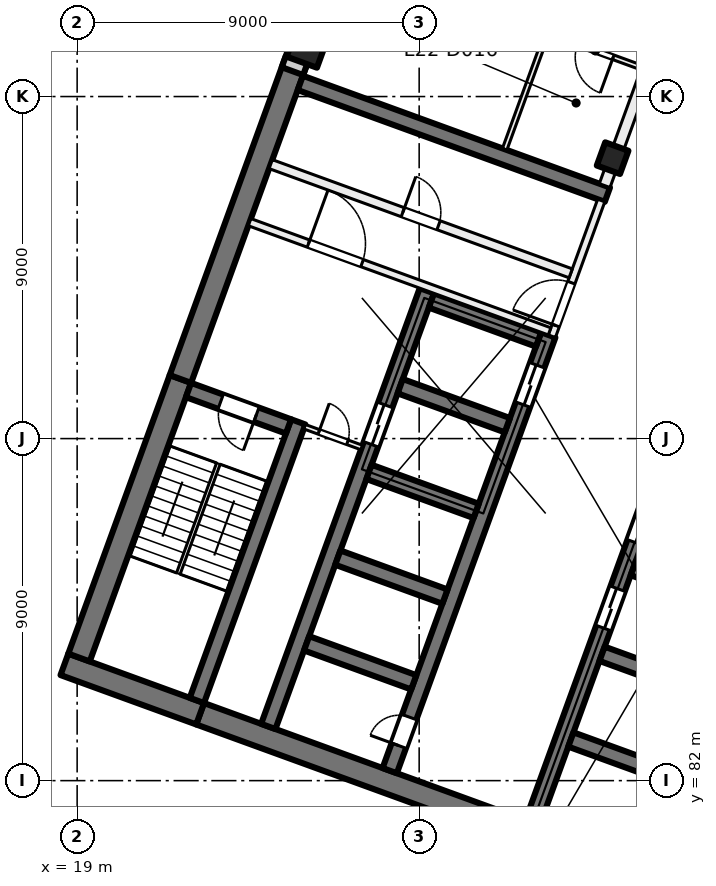
"""IFC4 building model, lengths in metres.
Left out: names, types, materials, properties, quantities, classifications, styles, units other than length and angle.
Written with IfcOpenShell. Run it as: python <this file> out.ifc"""

import sys

from ifc_helpers import new_model, si_unit, direction, frame, frame_2d, origin, origin_2d, place, context, subcontext, project, spatial, rectangle, extrude, element, fill, save


model = new_model("IFC4")
c1 = context("Model", 3, precision=1e-05, world=origin(), true_north=direction((0.0, 1.0)))
c2 = subcontext(c1, "Body", "Model", "MODEL_VIEW")
j1 = project(units=[si_unit("LENGTHUNIT", "METRE"), si_unit("PLANEANGLEUNIT", "RADIAN")], contexts=[c1])
p1 = place(None, origin())
s1 = spatial("IfcSite", under=j1, at=p1, CompositionType="ELEMENT")
p2 = place(p1, origin())
s2 = spatial("IfcBuilding", under=s1, at=p2, CompositionType="ELEMENT")
p3 = place(p2, frame((0.0, 0.0, 97.0)))
s3 = spatial("IfcBuildingStorey", under=s2, at=p3, CompositionType="ELEMENT", Elevation=97.0)
p4 = place(p3, frame((33.091, 98.379, 0.0), z_axis=(0.0, 0.0, 1.0), x_axis=(-0.342020143326, -0.939692620786, 0.0)))
e1 = element("IfcColumn", 1, at=p4, inside=s3, PredefinedType="COLUMN", context=c2, shape_type="SweptSolid", body=[
    extrude(rectangle(XDim=0.65, YDim=0.65, at=origin_2d()), origin(), (0.0, 0.0, 1.0), 4.0),
])
p5 = place(p3, frame((25.056, 101.303, 0.0), z_axis=(0.0, 0.0, 1.0), x_axis=(-0.342020143326, -0.939692620786, 0.0)))
e2 = element("IfcColumn", 2, at=p5, inside=s3, PredefinedType="COLUMN", context=c2, shape_type="SweptSolid", body=[
    extrude(rectangle(XDim=0.85, YDim=0.85, at=origin_2d()), origin(), (0.0, 0.0, 1.0), 4.0),
])
p6 = place(p3, frame((35.767, 78.835, 0.0), z_axis=(0.0, 0.0, 1.0), x_axis=(-0.939692894512, 0.342019391267, 0.0)))
e3 = element("IfcWall", 3, at=p6, inside=s3, PredefinedType="SHEAR", context=c2, shape_type="SweptSolid", body=[
    extrude(rectangle(XDim=14.4, YDim=0.6, at=frame_2d((7.2, 0.0))), origin(), (0.0, 0.0, 1.0), 4.0),
])
p7 = place(p3, frame((22.236, 83.76, 0.0), z_axis=(0.0, 0.0, 1.0), x_axis=(-0.939680822529, 0.342052557032, 0.0)))
e4 = element("IfcWall", 4, at=p7, inside=s3, PredefinedType="SHEAR", context=c2, shape_type="SweptSolid", body=[
    extrude(rectangle(XDim=3.8, YDim=0.6, at=frame_2d((1.9, 0.0))), origin(), (0.0, 0.0, 1.0), 4.0),
])
p8 = place(p3, frame((19.05, 85.239, 0.0), z_axis=(0.0, 0.0, 1.0), x_axis=(0.342016982193, 0.939693771338, 0.0)))
e5 = element("IfcWall", 5, at=p8, inside=s3, PredefinedType="SHEAR", context=c2, shape_type="SweptSolid", body=[
    extrude(rectangle(XDim=7.8, YDim=0.6, at=frame_2d((3.9, 0.0))), origin(), (0.0, 0.0, 1.0), 4.0),
])
p9 = place(p3, frame((21.717, 92.568, 0.0), z_axis=(0.0, 0.0, 1.0), x_axis=(0.342017595281, 0.939693548195, 0.0)))
e6 = element("IfcWall", 6, at=p9, inside=s3, PredefinedType="SHEAR", context=c2, shape_type="SweptSolid", body=[
    extrude(rectangle(XDim=8.925, YDim=0.6, at=frame_2d((4.462, 0.0))), origin(), (0.0, 0.0, 1.0), 4.0),
])
p10 = place(p3, frame((22.15, 84.11, 0.0), z_axis=(0.0, 0.0, 1.0), x_axis=(0.342016982193, 0.939693771338, 0.0)))
e7 = element("IfcWall", 7, at=p10, inside=s3, PredefinedType="SHEAR", context=c2, shape_type="SweptSolid", body=[
    extrude(rectangle(XDim=7.8, YDim=0.4, at=frame_2d((3.9, 0.0))), origin(), (0.0, 0.0, 1.0), 4.0),
])
p11 = place(p3, frame((24.562, 91.32, 0.0), z_axis=(0.0, 0.0, 1.0), x_axis=(-0.939717030584, 0.341953070509, 0.0)))
e8 = element("IfcWall", 8, at=p11, inside=s3, PredefinedType="SHEAR", context=c2, shape_type="SweptSolid", body=[
    extrude(rectangle(XDim=2.8, YDim=0.4, at=frame_2d((1.4, 0.0))), origin(), (0.0, 0.0, 1.0), 4.0),
])
p12 = place(p11, frame((0.9, 0.0, 0.0)))
e9 = element("IfcOpeningElement", 9, at=p12, cuts=e8, PredefinedType="OPENING", context=c2, shape_type="SweptSolid", body=[
    extrude(rectangle(XDim=1.0, YDim=2.1, at=frame_2d((0.5, 1.05))), frame((0.0, 0.21, 0.0), z_axis=(0.0, -1.0, 0.0), x_axis=(1.0, 0.0, 0.0)), (0.0, 0.0, 1.0), 0.42),
])
p13 = place(p3, frame((30.984, 80.895, 0.0), z_axis=(0.0, 0.0, 1.0), x_axis=(0.342021021735, 0.939692301071, 0.0)))
e10 = element("IfcWall", 10, at=p13, inside=s3, PredefinedType="SHEAR", context=c2, shape_type="SweptSolid", body=[
    extrude(rectangle(XDim=12.2, YDim=0.4, at=frame_2d((6.1, 0.0))), origin(), (0.0, 0.0, 1.0), 4.0),
])
p14 = place(p13, frame((5.45, 0.0, 0.0)))
e11 = element("IfcOpeningElement", 11, at=p14, cuts=e10, PredefinedType="OPENING", context=c2, shape_type="SweptSolid", body=[
    extrude(rectangle(XDim=1.1, YDim=2.1, at=frame_2d((0.55, 1.05))), frame((0.0, 0.21, 0.0), z_axis=(0.0, -1.0, 0.0), x_axis=(1.0, 0.0, 0.0)), (0.0, 0.0, 1.0), 0.42),
])
p15 = place(p13, frame((7.85, 0.0, 0.0)))
e12 = element("IfcOpeningElement", 12, at=p15, cuts=e10, PredefinedType="OPENING", context=c2, shape_type="SweptSolid", body=[
    extrude(rectangle(XDim=1.1, YDim=2.1, at=frame_2d((0.55, 1.05))), frame((0.0, 0.21, 0.0), z_axis=(0.0, -1.0, 0.0), x_axis=(1.0, 0.0, 0.0)), (0.0, 0.0, 1.0), 0.42),
])
p16 = place(p13, frame((10.25, 0.0, 0.0)))
e13 = element("IfcOpeningElement", 13, at=p16, cuts=e10, PredefinedType="OPENING", context=c2, shape_type="SweptSolid", body=[
    extrude(rectangle(XDim=1.1, YDim=2.1, at=frame_2d((0.55, 1.05))), frame((0.0, 0.21, 0.0), z_axis=(0.0, -1.0, 0.0), x_axis=(1.0, 0.0, 0.0)), (0.0, 0.0, 1.0), 0.42),
])
for number, where, z_axis, x_axis in (
    (14, (34.812, 82.056, 0.0), (0.0, 0.0, 1.0), (-0.94, 0.342, 0.0)),
    (15, (35.632, 84.311, 0.0), (0.0, 0.0, 1.0), (-0.94, 0.342, 0.0)),
    (16, (36.453, 86.566, 0.0), (0.0, 0.0, 1.0), (-0.94, 0.342, 0.0)),
):
    element("IfcWall", number, at=place(p3, frame(where, z_axis=z_axis, x_axis=x_axis)), inside=s3, PredefinedType="SHEAR", context=c2, shape_type="SweptSolid", body=[
        extrude(rectangle(XDim=3.0, YDim=0.4, at=frame_2d((1.5, 0.0))), origin(), (0.0, 0.0, 1.0), 4.0),
    ])
p17 = place(p3, frame((27.225, 82.263, 0.0), z_axis=(0.0, 0.0, 1.0), x_axis=(0.342014590177, 0.939694641948, 0.0)))
e17 = element("IfcWall", 17, at=p17, inside=s3, PredefinedType="SHEAR", context=c2, shape_type="SweptSolid", body=[
    extrude(rectangle(XDim=12.2, YDim=0.4, at=frame_2d((6.1, 0.0))), origin(), (0.0, 0.0, 1.0), 4.0),
])
p18 = place(p17, frame((10.25, 0.0, 0.0)))
e18 = element("IfcOpeningElement", 18, at=p18, cuts=e17, PredefinedType="OPENING", context=c2, shape_type="SweptSolid", body=[
    extrude(rectangle(XDim=1.1, YDim=2.1, at=frame_2d((0.55, 1.05))), frame((0.0, 0.21, 0.0), z_axis=(0.0, -1.0, 0.0), x_axis=(1.0, 0.0, 0.0)), (0.0, 0.0, 1.0), 0.42),
])
p19 = place(p17, frame((0.7, 0.0, 0.0)))
e19 = element("IfcOpeningElement", 19, at=p19, cuts=e17, PredefinedType="OPENING", context=c2, shape_type="SweptSolid", body=[
    extrude(rectangle(XDim=0.8, YDim=2.1, at=frame_2d((0.4, 1.05))), frame((0.0, 0.21, 0.0), z_axis=(0.0, -1.0, 0.0), x_axis=(1.0, 0.0, 0.0)), (0.0, 0.0, 1.0), 0.42),
])
p20 = place(p3, frame((24.03, 83.426, 0.0), z_axis=(0.0, 0.0, 1.0), x_axis=(0.342014590177, 0.939694641948, 0.0)))
e20 = element("IfcWall", 20, at=p20, inside=s3, PredefinedType="SHEAR", context=c2, shape_type="SweptSolid", body=[
    extrude(rectangle(XDim=12.2, YDim=0.4, at=frame_2d((6.1, 0.0))), origin(), (0.0, 0.0, 1.0), 4.0),
])
p21 = place(p20, frame((7.9, 0.0, 0.0)))
e21 = element("IfcOpeningElement", 21, at=p21, cuts=e20, PredefinedType="OPENING", context=c2, shape_type="SweptSolid", body=[
    extrude(rectangle(XDim=1.1, YDim=2.1, at=frame_2d((0.55, 1.05))), frame((0.0, 0.21, 0.0), z_axis=(0.0, -1.0, 0.0), x_axis=(1.0, 0.0, 0.0)), (0.0, 0.0, 1.0), 0.42),
])
p22 = place(p3, frame((27.858, 84.587, 0.0), z_axis=(0.0, 0.0, 1.0), x_axis=(-0.939686455819, 0.342037080957, 0.0)))
e22 = element("IfcWall", 22, at=p22, inside=s3, PredefinedType="SHEAR", context=c2, shape_type="SweptSolid", body=[
    extrude(rectangle(XDim=3.0, YDim=0.4, at=frame_2d((1.5, 0.0))), origin(), (0.0, 0.0, 1.0), 4.0),
])
p23 = place(p3, frame((28.678, 86.842, 0.0), z_axis=(0.0, 0.0, 1.0), x_axis=(-0.939676934218, 0.342063238742, 0.0)))
e23 = element("IfcWall", 23, at=p23, inside=s3, PredefinedType="SHEAR", context=c2, shape_type="SweptSolid", body=[
    extrude(rectangle(XDim=3.0, YDim=0.4, at=frame_2d((1.5, 0.0))), origin(), (0.0, 0.0, 1.0), 4.0),
])
for number, where, z_axis, x_axis in (
    (24, (29.5, 89.097, 0.0), (0.0, 0.0, 1.0), (-0.94, 0.342, 0.0)),
    (25, (30.32, 91.353, 0.0), (0.0, 0.0, 1.0), (-0.94, 0.342, 0.0)),
    (26, (31.141, 93.608, 0.0), (0.0, 0.0, 1.0), (-0.94, 0.342, 0.0)),
):
    element("IfcWall", number, at=place(p3, frame(where, z_axis=z_axis, x_axis=x_axis)), inside=s3, PredefinedType="SHEAR", context=c2, shape_type="SweptSolid", body=[
        extrude(rectangle(XDim=3.0, YDim=0.4, at=frame_2d((1.5, 0.0))), origin(), (0.0, 0.0, 1.0), 4.0),
    ])
p24 = place(p3, frame((32.953, 97.418, 0.0), z_axis=(0.0, 0.0, 1.0), x_axis=(-0.93969060187, 0.342025690201, 0.0)))
e27 = element("IfcWall", 27, at=p24, inside=s3, PredefinedType="SHEAR", context=c2, shape_type="SweptSolid", body=[
    extrude(rectangle(XDim=8.6, YDim=0.4, at=frame_2d((4.3, 0.0))), origin(), (0.0, 0.0, 1.0), 4.0),
])
p25 = place(p3, frame((24.666, 100.669, 0.0), z_axis=(0.0, 0.0, 1.0), x_axis=(0.34201964167, 0.939692803373, 0.0)))
e28 = element("IfcWall", 28, at=p25, inside=s3, PredefinedType="SOLIDWALL", context=c2, shape_type="SweptSolid", body=[
    extrude(rectangle(XDim=32.884, YDim=0.6, at=frame_2d((16.442, 0.0))), origin(), (0.0, 0.0, 1.0), 3.625),
])
p26 = place(p25, frame((1.48, 0.0, 0.9)))
e29 = element("IfcOpeningElement", 29, at=p26, cuts=e28, PredefinedType="OPENING", context=c2, shape_type="SweptSolid", body=[
    extrude(rectangle(XDim=3.0, YDim=2.4, at=frame_2d((1.5, 1.2))), frame((0.0, 0.31, 0.0), z_axis=(0.0, -1.0, 0.0), x_axis=(1.0, 0.0, 0.0)), (0.0, 0.0, 1.0), 0.62),
])
p27 = place(p25, frame((5.98, 0.0, 0.9)))
e30 = element("IfcOpeningElement", 30, at=p27, cuts=e28, PredefinedType="OPENING", context=c2, shape_type="SweptSolid", body=[
    extrude(rectangle(XDim=3.0, YDim=2.4, at=frame_2d((1.5, 1.2))), frame((0.0, 0.31, 0.0), z_axis=(0.0, -1.0, 0.0), x_axis=(1.0, 0.0, 0.0)), (0.0, 0.0, 1.0), 0.62),
])
p28 = place(p25, frame((10.48, 0.0, 0.9)))
e31 = element("IfcOpeningElement", 31, at=p28, cuts=e28, PredefinedType="OPENING", context=c2, shape_type="SweptSolid", body=[
    extrude(rectangle(XDim=3.0, YDim=2.4, at=frame_2d((1.5, 1.2))), frame((0.0, 0.31, 0.0), z_axis=(0.0, -1.0, 0.0), x_axis=(1.0, 0.0, 0.0)), (0.0, 0.0, 1.0), 0.62),
])
p29 = place(p25, frame((14.98, 0.0, 0.9)))
e32 = element("IfcOpeningElement", 32, at=p29, cuts=e28, PredefinedType="OPENING", context=c2, shape_type="SweptSolid", body=[
    extrude(rectangle(XDim=3.0, YDim=2.4, at=frame_2d((1.5, 1.2))), frame((0.0, 0.31, 0.0), z_axis=(0.0, -1.0, 0.0), x_axis=(1.0, 0.0, 0.0)), (0.0, 0.0, 1.0), 0.62),
])
p30 = place(p25, frame((19.48, 0.0, 0.9)))
e33 = element("IfcOpeningElement", 33, at=p30, cuts=e28, PredefinedType="OPENING", context=c2, shape_type="SweptSolid", body=[
    extrude(rectangle(XDim=3.0, YDim=2.4, at=frame_2d((1.5, 1.2))), frame((0.0, 0.31, 0.0), z_axis=(0.0, -1.0, 0.0), x_axis=(1.0, 0.0, 0.0)), (0.0, 0.0, 1.0), 0.62),
])
p31 = place(p25, frame((23.98, 0.0, 0.9)))
e34 = element("IfcOpeningElement", 34, at=p31, cuts=e28, PredefinedType="OPENING", context=c2, shape_type="SweptSolid", body=[
    extrude(rectangle(XDim=3.0, YDim=2.4, at=frame_2d((1.5, 1.2))), frame((0.0, 0.31, 0.0), z_axis=(0.0, -1.0, 0.0), x_axis=(1.0, 0.0, 0.0)), (0.0, 0.0, 1.0), 0.62),
])
p32 = place(p25, frame((28.48, 0.0, 0.9)))
e35 = element("IfcOpeningElement", 35, at=p32, cuts=e28, PredefinedType="OPENING", context=c2, shape_type="SweptSolid", body=[
    extrude(rectangle(XDim=3.0, YDim=2.4, at=frame_2d((1.5, 1.2))), frame((0.0, 0.31, 0.0), z_axis=(0.0, -1.0, 0.0), x_axis=(1.0, 0.0, 0.0)), (0.0, 0.0, 1.0), 0.62),
])
p33 = place(p3, frame((31.491, 93.693, 0.0), z_axis=(0.0, 0.0, 1.0), x_axis=(0.341995824804, 0.939701471648, 0.0)))
e36 = element("IfcWall", 36, at=p33, inside=s3, PredefinedType="PARTITIONING", context=c2, shape_type="SweptSolid", body=[
    extrude(rectangle(XDim=3.8, YDim=0.2, at=frame_2d((1.9, 0.0))), origin(), (0.0, 0.0, 1.0), 3.625),
])
p34 = place(p33, frame((0.3, 0.0, 0.0)))
e37 = element("IfcOpeningElement", 37, at=p34, cuts=e36, PredefinedType="OPENING", context=c2, shape_type="SweptSolid", body=[
    extrude(rectangle(XDim=1.2, YDim=2.1, at=frame_2d((0.6, 1.05))), frame((0.0, 0.11, 0.0), z_axis=(0.0, -1.0, 0.0), x_axis=(1.0, 0.0, 0.0)), (0.0, 0.0, 1.0), 0.22),
])
p35 = place(p3, frame((23.538, 96.694, 0.0), z_axis=(0.0, 0.0, 1.0), x_axis=(0.939691552312, -0.342023078919, 0.0)))
e38 = element("IfcWall", 38, at=p35, inside=s3, PredefinedType="PARTITIONING", context=c2, shape_type="SweptSolid", body=[
    extrude(rectangle(XDim=8.4, YDim=0.2, at=frame_2d((4.2, 0.0))), origin(), (0.0, 0.0, 1.0), 3.625),
])
p36 = place(p35, frame((1.65, 0.0, 0.0)))
e39 = element("IfcOpeningElement", 39, at=p36, cuts=e38, PredefinedType="OPENING", context=c2, shape_type="SweptSolid", body=[
    extrude(rectangle(XDim=1.5, YDim=2.1, at=frame_2d((0.75, 1.05))), frame((0.0, 0.11, 0.0), z_axis=(0.0, -1.0, 0.0), x_axis=(1.0, 0.0, 0.0)), (0.0, 0.0, 1.0), 0.22),
])
p37 = place(p3, frame((24.094, 98.221, 0.0), z_axis=(0.0, 0.0, 1.0), x_axis=(0.939691552312, -0.342023078919, 0.0)))
e40 = element("IfcWall", 40, at=p37, inside=s3, PredefinedType="PARTITIONING", context=c2, shape_type="SweptSolid", body=[
    extrude(rectangle(XDim=8.4, YDim=0.25, at=frame_2d((4.2, 0.0))), origin(), (0.0, 0.0, 1.0), 3.625),
])
p38 = place(p37, frame((3.7, 0.0, 0.0)))
e41 = element("IfcOpeningElement", 41, at=p38, cuts=e40, PredefinedType="OPENING", context=c2, shape_type="SweptSolid", body=[
    extrude(rectangle(XDim=1.0, YDim=2.1, at=frame_2d((0.5, 1.05))), frame((0.0, 0.135, 0.0), z_axis=(0.0, -1.0, 0.0), x_axis=(1.0, 0.0, 0.0)), (0.0, 0.0, 1.0), 0.27),
])
p39 = place(p3, frame((24.985, 91.312, 0.0), z_axis=(0.0, 0.0, 1.0), x_axis=(0.939708740826, -0.341975850632, 0.0)))
e42 = element("IfcWall", 42, at=p39, inside=s3, PredefinedType="PARTITIONING", context=c2, shape_type="SweptSolid", body=[
    extrude(rectangle(XDim=1.6, YDim=0.125, at=frame_2d((0.8, 0.0))), origin(), (0.0, 0.0, 1.0), 3.625),
])
p40 = place(p39, frame((0.4, 0.0, 0.0)))
e43 = element("IfcOpeningElement", 43, at=p40, cuts=e42, PredefinedType="OPENING", context=c2, shape_type="SweptSolid", body=[
    extrude(rectangle(XDim=0.8, YDim=2.1, at=frame_2d((0.4, 1.05))), frame((0.0, 0.073, 0.0), z_axis=(0.0, -1.0, 0.0), x_axis=(1.0, 0.0, 0.0)), (0.0, 0.0, 1.0), 0.145),
])
p41 = place(p3, frame((30.25, 98.615, 0.0), z_axis=(0.0, 0.0, 1.0), x_axis=(0.341998018937, 0.93970067311, 0.0)))
e44 = element("IfcWall", 44, at=p41, inside=s3, PredefinedType="PARTITIONING", context=c2, shape_type="SweptSolid", body=[
    extrude(rectangle(XDim=9.687, YDim=0.125, at=frame_2d((4.844, 0.0))), origin(), (0.0, 0.0, 1.0), 3.625),
])
p42 = place(p41, frame((7.078, 0.0, 0.0)))
e45 = element("IfcOpeningElement", 45, at=p42, cuts=e44, PredefinedType="OPENING", context=c2, shape_type="SweptSolid", body=[
    extrude(rectangle(XDim=0.8, YDim=2.1, at=frame_2d((0.4, 1.05))), frame((0.0, 0.073, 0.0), z_axis=(0.0, -1.0, 0.0), x_axis=(1.0, 0.0, 0.0)), (0.0, 0.0, 1.0), 0.145),
])
p43 = place(p41, frame((3.848, 0.0, 0.0)))
e46 = element("IfcOpeningElement", 46, at=p43, cuts=e44, PredefinedType="OPENING", context=c2, shape_type="SweptSolid", body=[
    extrude(rectangle(XDim=0.8, YDim=2.1, at=frame_2d((0.4, 1.05))), frame((0.0, 0.073, 0.0), z_axis=(0.0, -1.0, 0.0), x_axis=(1.0, 0.0, 0.0)), (0.0, 0.0, 1.0), 0.145),
])
p44 = place(p3, frame((33.852, 100.762, 0.0), z_axis=(0.0, 0.0, 1.0), x_axis=(-0.93959774877, 0.342280689649, 0.0)))
e47 = element("IfcWall", 47, at=p44, inside=s3, PredefinedType="PARTITIONING", context=c2, shape_type="SweptSolid", body=[
    extrude(rectangle(XDim=2.588, YDim=0.125, at=frame_2d((1.294, 0.0))), origin(), (0.0, 0.0, 1.0), 3.625),
])
p45 = place(p44, frame((0.794, 0.0, 0.0)))
e48 = element("IfcOpeningElement", 48, at=p45, cuts=e47, PredefinedType="OPENING", context=c2, shape_type="SweptSolid", body=[
    extrude(rectangle(XDim=1.0, YDim=2.1, at=frame_2d((0.5, 1.05))), frame((0.0, 0.073, 0.0), z_axis=(0.0, -1.0, 0.0), x_axis=(1.0, 0.0, 0.0)), (0.0, 0.0, 1.0), 0.145),
])
p46 = place(p3, frame((44.686, 130.091, 0.0), z_axis=(0.0, 0.0, 1.0), x_axis=(-0.342017360004, -0.939693633828, 0.0)))
e49 = element("IfcWall", 49, at=p46, inside=s3, PredefinedType="PARTITIONING", context=c2, shape_type="SweptSolid", body=[
    extrude(rectangle(XDim=34.516, YDim=0.3, at=frame_2d((17.258, 0.0))), origin(), (0.0, 0.0, 1.0), 3.625),
])
p47 = place(p46, frame((27.515, 0.0, 0.0)))
e50 = element("IfcOpeningElement", 50, at=p47, cuts=e49, PredefinedType="OPENING", context=c2, shape_type="SweptSolid", body=[
    extrude(rectangle(XDim=1.0, YDim=2.1, at=frame_2d((0.5, 1.05))), frame((0.0, 0.16, 0.0), z_axis=(0.0, -1.0, 0.0), x_axis=(1.0, 0.0, 0.0)), (0.0, 0.0, 1.0), 0.32),
])
p48 = place(p46, frame((16.865, 0.0, 0.0)))
e51 = element("IfcOpeningElement", 51, at=p48, cuts=e49, PredefinedType="OPENING", context=c2, shape_type="SweptSolid", body=[
    extrude(rectangle(XDim=1.8, YDim=2.1, at=frame_2d((0.9, 1.05))), frame((0.0, 0.16, 0.0), z_axis=(0.0, -1.0, 0.0), x_axis=(1.0, 0.0, 0.0)), (0.0, 0.0, 1.0), 0.32),
])
p49 = place(p46, frame((2.554, 0.0, 0.0)))
e52 = element("IfcOpeningElement", 52, at=p49, cuts=e49, PredefinedType="OPENING", context=c2, shape_type="SweptSolid", body=[
    extrude(rectangle(XDim=1.8, YDim=2.1, at=frame_2d((0.9, 1.05))), frame((0.0, 0.16, 0.0), z_axis=(0.0, -1.0, 0.0), x_axis=(1.0, 0.0, 0.0)), (0.0, 0.0, 1.0), 0.32),
])
p50 = place(p18, origin())
e53 = element("IfcDoor", 53, at=p50, inside=s3, OperationType="DOUBLE_DOOR_SLIDING", PredefinedType="DOOR", context=c2, shape_type="SweptSolid", body=[
    extrude(rectangle(XDim=1.1, YDim=2.1, at=frame_2d((0.55, 1.05))), frame((0.0, 0.025, 0.0), z_axis=(0.0, -1.0, 0.0), x_axis=(1.0, 0.0, 0.0)), (0.0, 0.0, 1.0), 0.05),
])
fill(e18, e53)
p51 = place(p14, origin())
e54 = element("IfcDoor", 54, at=p51, inside=s3, OperationType="DOUBLE_DOOR_SLIDING", PredefinedType="DOOR", context=c2, shape_type="SweptSolid", body=[
    extrude(rectangle(XDim=1.1, YDim=2.1, at=frame_2d((0.55, 1.05))), frame((0.0, 0.025, 0.0), z_axis=(0.0, -1.0, 0.0), x_axis=(1.0, 0.0, 0.0)), (0.0, 0.0, 1.0), 0.05),
])
fill(e11, e54)
p52 = place(p15, origin())
e55 = element("IfcDoor", 55, at=p52, inside=s3, OperationType="DOUBLE_DOOR_SLIDING", PredefinedType="DOOR", context=c2, shape_type="SweptSolid", body=[
    extrude(rectangle(XDim=1.1, YDim=2.1, at=frame_2d((0.55, 1.05))), frame((0.0, 0.025, 0.0), z_axis=(0.0, -1.0, 0.0), x_axis=(1.0, 0.0, 0.0)), (0.0, 0.0, 1.0), 0.05),
])
fill(e12, e55)
p53 = place(p19, origin())
e56 = element("IfcDoor", 56, at=p53, inside=s3, OperationType="SINGLE_SWING_LEFT", PredefinedType="DOOR", context=c2, shape_type="SweptSolid", body=[
    extrude(rectangle(XDim=0.8, YDim=2.1, at=frame_2d((0.4, 1.05))), frame((0.0, 0.025, 0.0), z_axis=(0.0, -1.0, 0.0), x_axis=(1.0, 0.0, 0.0)), (0.0, 0.0, 1.0), 0.05),
])
fill(e19, e56)
p54 = place(p34, origin())
e57 = element("IfcDoor", 57, at=p54, inside=s3, OperationType="DOUBLE_DOOR_SINGLE_SWING", PredefinedType="DOOR", context=c2, shape_type="SweptSolid", body=[
    extrude(rectangle(XDim=1.2, YDim=2.1, at=frame_2d((0.6, 1.05))), frame((0.0, 0.025, 0.0), z_axis=(0.0, -1.0, 0.0), x_axis=(1.0, 0.0, 0.0)), (0.0, 0.0, 1.0), 0.05),
])
fill(e37, e57)
p55 = place(p36, origin())
e58 = element("IfcDoor", 58, at=p55, inside=s3, OperationType="DOUBLE_DOOR_SINGLE_SWING", PredefinedType="DOOR", context=c2, shape_type="SweptSolid", body=[
    extrude(rectangle(XDim=1.5, YDim=2.1, at=frame_2d((0.75, 1.05))), frame((0.0, 0.025, 0.0), z_axis=(0.0, -1.0, 0.0), x_axis=(1.0, 0.0, 0.0)), (0.0, 0.0, 1.0), 0.05),
])
fill(e39, e58)
p56 = place(p12, origin())
e59 = element("IfcDoor", 59, at=p56, inside=s3, OperationType="SINGLE_SWING_LEFT", PredefinedType="DOOR", context=c2, shape_type="SweptSolid", body=[
    extrude(rectangle(XDim=1.0, YDim=2.1, at=frame_2d((0.5, 1.05))), frame((0.0, 0.025, 0.0), z_axis=(0.0, -1.0, 0.0), x_axis=(1.0, 0.0, 0.0)), (0.0, 0.0, 1.0), 0.05),
])
fill(e9, e59)
p57 = place(p40, origin())
e60 = element("IfcDoor", 60, at=p57, inside=s3, OperationType="SINGLE_SWING_RIGHT", PredefinedType="DOOR", context=c2, shape_type="SweptSolid", body=[
    extrude(rectangle(XDim=0.8, YDim=2.1, at=frame_2d((0.4, 1.05))), frame((0.0, 0.025, 0.0), z_axis=(0.0, -1.0, 0.0), x_axis=(1.0, 0.0, 0.0)), (0.0, 0.0, 1.0), 0.05),
])
fill(e43, e60)
p58 = place(p38, origin())
e61 = element("IfcDoor", 61, at=p58, inside=s3, OperationType="SINGLE_SWING_LEFT", PredefinedType="DOOR", context=c2, shape_type="SweptSolid", body=[
    extrude(rectangle(XDim=1.0, YDim=2.1, at=frame_2d((0.5, 1.05))), frame((0.0, 0.025, 0.0), z_axis=(0.0, -1.0, 0.0), x_axis=(1.0, 0.0, 0.0)), (0.0, 0.0, 1.0), 0.05),
])
fill(e41, e61)
p59 = place(p21, origin())
e62 = element("IfcDoor", 62, at=p59, inside=s3, OperationType="DOUBLE_DOOR_SLIDING", PredefinedType="DOOR", context=c2, shape_type="SweptSolid", body=[
    extrude(rectangle(XDim=1.1, YDim=2.1, at=frame_2d((0.55, 1.05))), frame((0.0, 0.025, 0.0), z_axis=(0.0, -1.0, 0.0), x_axis=(1.0, 0.0, 0.0)), (0.0, 0.0, 1.0), 0.05),
])
fill(e21, e62)
p60 = place(p45, origin())
e63 = element("IfcDoor", 63, at=p60, inside=s3, OperationType="SINGLE_SWING_RIGHT", PredefinedType="DOOR", context=c2, shape_type="SweptSolid", body=[
    extrude(rectangle(XDim=1.0, YDim=2.1, at=frame_2d((0.5, 1.05))), frame((0.0, 0.025, 0.0), z_axis=(0.0, -1.0, 0.0), x_axis=(1.0, 0.0, 0.0)), (0.0, 0.0, 1.0), 0.05),
])
fill(e48, e63)
save(model, sys.argv[1])
